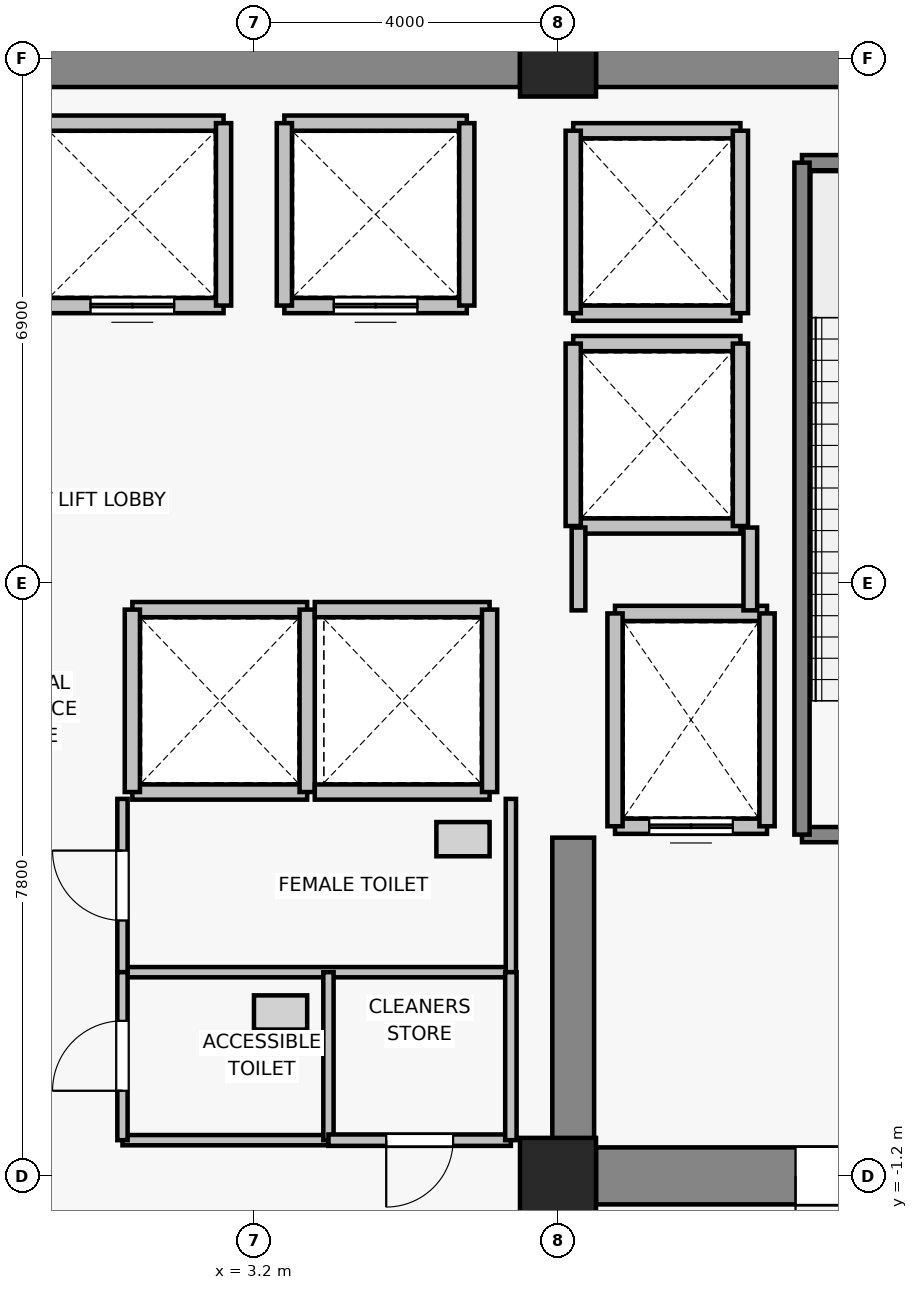
"""IFC4 building model, lengths in metres.
Left out: names, types, materials, properties, quantities, classifications, styles, units other than length and angle.
Written with IfcOpenShell. Run it as: python <this file> out.ifc"""

import sys

from ifc_helpers import new_model, si_unit, direction, frame, frame_2d, origin, origin_2d, place, context, subcontext, project, spatial, rectangle, extrude, source, transform, mapped, element, fill, save


model = new_model("IFC4")
c1 = context("Model", 3, precision=1e-05, world=origin(), true_north=direction((0.0, 1.0)))
c2 = subcontext(c1, "Body", "Model", "MODEL_VIEW")
j1 = project(units=[si_unit("LENGTHUNIT", "METRE"), si_unit("PLANEANGLEUNIT", "RADIAN")], contexts=[c1])
p1 = place(None, origin())
s1 = spatial("IfcSite", under=j1, at=p1, CompositionType="ELEMENT")
p2 = place(p1, origin())
s2 = spatial("IfcBuilding", under=s1, at=p2, CompositionType="ELEMENT")
p3 = place(p2, frame((0.0, 0.0, 80.2)))
s3 = spatial("IfcBuildingStorey", under=s2, at=p3, CompositionType="ELEMENT", Elevation=80.2)
for number, where, z_axis, x_axis in (
    (1, (7.2, -1.2, 0.0), (0.0, 0.0, 1.0), (1.0, 0.0, 0.0)),
    (2, (7.2, 13.5, 0.0), (0.0, 0.0, 1.0), (1.0, 0.0, 0.0)),
):
    element("IfcColumn", number, at=place(p3, frame(where, z_axis=z_axis, x_axis=x_axis)), inside=s3, PredefinedType="COLUMN", context=c2, shape_type="SweptSolid", body=[
        extrude(rectangle(XDim=1.0, YDim=1.0, at=origin_2d()), origin(), (0.0, 0.0, 1.0), 6.6),
    ])
p4 = place(p3, frame((-6.7, 13.5, 0.0), z_axis=(0.0, 0.0, 1.0), x_axis=(1.0, 0.0, 0.0)))
e3 = element("IfcWall", 3, at=p4, inside=s3, PredefinedType="SHEAR", context=c2, shape_type="SweptSolid", body=[
    extrude(rectangle(XDim=13.4, YDim=0.75, at=frame_2d((6.7, 0.0))), origin(), (0.0, 0.0, 1.0), 6.35),
])
p5 = place(p3, frame((7.7, 13.5, 0.0), z_axis=(0.0, 0.0, 1.0), x_axis=(1.0, 0.0, 0.0)))
e4 = element("IfcWall", 4, at=p5, inside=s3, PredefinedType="SHEAR", context=c2, shape_type="SweptSolid", body=[
    extrude(rectangle(XDim=6.2, YDim=0.75, at=frame_2d((3.1, 0.0))), origin(), (0.0, 0.0, 1.0), 6.35),
])
p6 = place(p3, frame((13.9, -1.2, 0.0), z_axis=(0.0, 0.0, 1.0), x_axis=(-1.0, 0.0, 0.0)))
e5 = element("IfcWall", 5, at=p6, inside=s3, PredefinedType="SHEAR", context=c2, shape_type="SweptSolid", body=[
    extrude(rectangle(XDim=6.2, YDim=0.75, at=frame_2d((3.1, 0.0))), origin(), (0.0, 0.0, 1.0), 6.35),
])
p7 = place(p6, frame((2.425, 0.0, 0.0)))
e6 = element("IfcOpeningElement", 6, at=p7, cuts=e5, PredefinedType="OPENING", context=c2, shape_type="SweptSolid", body=[
    extrude(rectangle(XDim=1.15, YDim=2.15, at=frame_2d((0.575, 1.075))), frame((0.0, 0.385, 0.0), z_axis=(0.0, -1.0, 0.0), x_axis=(1.0, 0.0, 0.0)), (0.0, 0.0, 1.0), 0.77),
])
p8 = place(p3, frame((7.4, -0.825, 0.0), z_axis=(0.0, 0.0, 1.0), x_axis=(0.0, 1.0, 0.0)))
e7 = element("IfcWall", 7, at=p8, inside=s3, PredefinedType="SHEAR", context=c2, shape_type="SweptSolid", body=[
    extrude(rectangle(XDim=4.075, YDim=0.55, at=frame_2d((2.038, 0.0))), origin(), (0.0, 0.0, 1.0), 6.35),
])
p9 = place(p3, frame((9.95, 3.4, 0.0), z_axis=(0.0, 0.0, 1.0), x_axis=(-1.0, 0.0, 0.0)))
e8 = element("IfcWall", 8, at=p9, inside=s3, PredefinedType="SOLIDWALL", context=c2, shape_type="SweptSolid", body=[
    extrude(rectangle(XDim=2.0, YDim=0.2, at=frame_2d((1.0, 0.0))), origin(), (0.0, 0.0, 1.0), 6.35),
])
p10 = place(p9, frame((0.45, 0.0, 0.0)))
e9 = element("IfcOpeningElement", 9, at=p10, cuts=e8, PredefinedType="OPENING", context=c2, shape_type="SweptSolid", body=[
    extrude(rectangle(XDim=1.1, YDim=2.2, at=frame_2d((0.55, 1.1))), frame((0.0, 0.11, 0.0), z_axis=(0.0, -1.0, 0.0), x_axis=(1.0, 0.0, 0.0)), (0.0, 0.0, 1.0), 0.22),
])
p11 = place(p3, frame((7.95, 6.2, 0.0), z_axis=(0.0, 0.0, 1.0), x_axis=(1.0, 0.0, 0.0)))
e10 = element("IfcWall", 10, at=p11, inside=s3, PredefinedType="SOLIDWALL", context=c2, shape_type="SweptSolid", body=[
    extrude(rectangle(XDim=2.0, YDim=0.2, at=frame_2d((1.0, 0.0))), origin(), (0.0, 0.0, 1.0), 6.35),
])
for number, where, z_axis, x_axis in (
    (11, (7.95, 3.4, 0.0), (0.0, 0.0, 1.0), (0.0, 1.0, 0.0)),
    (12, (9.95, 6.2, 0.0), (0.0, 0.0, 1.0), (0.0, -1.0, 0.0)),
):
    element("IfcWall", number, at=place(p3, frame(where, z_axis=z_axis, x_axis=x_axis)), inside=s3, PredefinedType="SOLIDWALL", context=c2, shape_type="SweptSolid", body=[
        extrude(rectangle(XDim=2.8, YDim=0.2, at=frame_2d((1.4, 0.0))), origin(), (0.0, 0.0, 1.0), 6.35),
    ])
p12 = place(p3, frame((2.8, 10.25, 0.0), z_axis=(0.0, 0.0, 1.0), x_axis=(-1.0, 0.0, 0.0)))
e13 = element("IfcWall", 13, at=p12, inside=s3, PredefinedType="SOLIDWALL", context=c2, shape_type="SweptSolid", body=[
    extrude(rectangle(XDim=2.4, YDim=0.2, at=frame_2d((1.2, 0.0))), origin(), (0.0, 0.0, 1.0), 6.35),
])
p13 = place(p12, frame((0.65, 0.0, 0.0)))
e14 = element("IfcOpeningElement", 14, at=p13, cuts=e13, PredefinedType="OPENING", context=c2, shape_type="SweptSolid", body=[
    extrude(rectangle(XDim=1.1, YDim=2.2, at=frame_2d((0.55, 1.1))), frame((0.0, 0.11, 0.0), z_axis=(0.0, -1.0, 0.0), x_axis=(1.0, 0.0, 0.0)), (0.0, 0.0, 1.0), 0.22),
])
p14 = place(p3, frame((0.4, 12.65, 0.0), z_axis=(0.0, 0.0, 1.0), x_axis=(1.0, 0.0, 0.0)))
e15 = element("IfcWall", 15, at=p14, inside=s3, PredefinedType="SOLIDWALL", context=c2, shape_type="SweptSolid", body=[
    extrude(rectangle(XDim=2.4, YDim=0.2, at=frame_2d((1.2, 0.0))), origin(), (0.0, 0.0, 1.0), 6.35),
])
p15 = place(p3, frame((2.8, 12.65, 0.0), z_axis=(0.0, 0.0, 1.0), x_axis=(0.0, -1.0, 0.0)))
e16 = element("IfcWall", 16, at=p15, inside=s3, PredefinedType="SOLIDWALL", context=c2, shape_type="SweptSolid", body=[
    extrude(rectangle(XDim=2.4, YDim=0.2, at=frame_2d((1.2, 0.0))), origin(), (0.0, 0.0, 1.0), 6.35),
])
p16 = place(p3, frame((6.0, 10.25, 0.0), z_axis=(0.0, 0.0, 1.0), x_axis=(-1.0, 0.0, 0.0)))
e17 = element("IfcWall", 17, at=p16, inside=s3, PredefinedType="SOLIDWALL", context=c2, shape_type="SweptSolid", body=[
    extrude(rectangle(XDim=2.4, YDim=0.2, at=frame_2d((1.2, 0.0))), origin(), (0.0, 0.0, 1.0), 5.89),
])
p17 = place(p16, frame((0.65, 0.0, 0.0)))
e18 = element("IfcOpeningElement", 18, at=p17, cuts=e17, PredefinedType="OPENING", context=c2, shape_type="SweptSolid", body=[
    extrude(rectangle(XDim=1.1, YDim=2.2, at=frame_2d((0.55, 1.1))), frame((0.0, 0.11, 0.0), z_axis=(0.0, -1.0, 0.0), x_axis=(1.0, 0.0, 0.0)), (0.0, 0.0, 1.0), 0.22),
])
p18 = place(p3, frame((3.6, 12.65, 0.0), z_axis=(0.0, 0.0, 1.0), x_axis=(1.0, 0.0, 0.0)))
e19 = element("IfcWall", 19, at=p18, inside=s3, PredefinedType="SOLIDWALL", context=c2, shape_type="SweptSolid", body=[
    extrude(rectangle(XDim=2.4, YDim=0.2, at=frame_2d((1.2, 0.0))), origin(), (0.0, 0.0, 1.0), 5.89),
])
for number, where, z_axis, x_axis in (
    (20, (3.6, 10.25, 0.0), (0.0, 0.0, 1.0), (0.0, 1.0, 0.0)),
    (21, (6.0, 12.65, 0.0), (0.0, 0.0, 1.0), (0.0, -1.0, 0.0)),
):
    element("IfcWall", number, at=place(p3, frame(where, z_axis=z_axis, x_axis=x_axis)), inside=s3, PredefinedType="SOLIDWALL", context=c2, shape_type="SweptSolid", body=[
        extrude(rectangle(XDim=2.4, YDim=0.2, at=frame_2d((1.2, 0.0))), origin(), (0.0, 0.0, 1.0), 6.35),
    ])
for number, where, z_axis, x_axis in (
    (22, (3.9, 3.85, 0.0), (0.0, 0.0, 1.0), (-1.0, 0.0, 0.0)),
    (23, (1.6, 6.25, 0.0), (0.0, 0.0, 1.0), (1.0, 0.0, 0.0)),
):
    element("IfcWall", number, at=place(p3, frame(where, z_axis=z_axis, x_axis=x_axis)), inside=s3, PredefinedType="SOLIDWALL", context=c2, shape_type="SweptSolid", body=[
        extrude(rectangle(XDim=2.3, YDim=0.2, at=frame_2d((1.15, 0.0))), origin(), (0.0, 0.0, 1.0), 6.35),
    ])
for number, where, z_axis, x_axis in (
    (24, (1.6, 3.85, 0.0), (0.0, 0.0, 1.0), (0.0, 1.0, 0.0)),
    (25, (3.9, 6.25, 0.0), (0.0, 0.0, 1.0), (0.0, -1.0, 0.0)),
):
    element("IfcWall", number, at=place(p3, frame(where, z_axis=z_axis, x_axis=x_axis)), inside=s3, PredefinedType="SOLIDWALL", context=c2, shape_type="SweptSolid", body=[
        extrude(rectangle(XDim=2.4, YDim=0.2, at=frame_2d((1.2, 0.0))), origin(), (0.0, 0.0, 1.0), 6.35),
    ])
for number, where, z_axis, x_axis in (
    (26, (6.3, 3.85, 0.0), (0.0, 0.0, 1.0), (-1.0, 0.0, 0.0)),
    (27, (4.0, 6.25, 0.0), (0.0, 0.0, 1.0), (1.0, 0.0, 0.0)),
):
    element("IfcWall", number, at=place(p3, frame(where, z_axis=z_axis, x_axis=x_axis)), inside=s3, PredefinedType="SOLIDWALL", context=c2, shape_type="SweptSolid", body=[
        extrude(rectangle(XDim=2.3, YDim=0.2, at=frame_2d((1.15, 0.0))), origin(), (0.0, 0.0, 1.0), 6.35),
    ])
p19 = place(p3, frame((6.3, 6.25, 0.0), z_axis=(0.0, 0.0, 1.0), x_axis=(0.0, -1.0, 0.0)))
e28 = element("IfcWall", 28, at=p19, inside=s3, PredefinedType="SOLIDWALL", context=c2, shape_type="SweptSolid", body=[
    extrude(rectangle(XDim=2.4, YDim=0.2, at=frame_2d((1.2, 0.0))), origin(), (0.0, 0.0, 1.0), 6.35),
])
for number, where, z_axis, x_axis in (
    (29, (9.6, 7.35, 0.0), (0.0, 0.0, 1.0), (-1.0, 0.0, 0.0)),
    (30, (7.4, 9.75, 0.0), (0.0, 0.0, 1.0), (1.0, 0.0, 0.0)),
):
    element("IfcWall", number, at=place(p3, frame(where, z_axis=z_axis, x_axis=x_axis)), inside=s3, PredefinedType="SOLIDWALL", context=c2, shape_type="SweptSolid", body=[
        extrude(rectangle(XDim=2.2, YDim=0.2, at=frame_2d((1.1, 0.0))), origin(), (0.0, 0.0, 1.0), 5.79),
    ])
p20 = place(p3, frame((7.4, 7.35, 0.0), z_axis=(0.0, 0.0, 1.0), x_axis=(0.0, 1.0, 0.0)))
e31 = element("IfcWall", 31, at=p20, inside=s3, PredefinedType="SOLIDWALL", context=c2, shape_type="SweptSolid", body=[
    extrude(rectangle(XDim=2.4, YDim=0.2, at=frame_2d((1.2, 0.0))), origin(), (0.0, 0.0, 1.0), 5.79),
])
p21 = place(p3, frame((9.6, 9.75, 0.0), z_axis=(0.0, 0.0, 1.0), x_axis=(0.0, -1.0, 0.0)))
e32 = element("IfcWall", 32, at=p21, inside=s3, PredefinedType="SOLIDWALL", context=c2, shape_type="SweptSolid", body=[
    extrude(rectangle(XDim=2.4, YDim=0.2, at=frame_2d((1.2, 0.0))), origin(), (0.0, 0.0, 1.0), 6.35),
])
for number, where, z_axis, x_axis in (
    (33, (9.6, 10.15, 0.0), (0.0, 0.0, 1.0), (-1.0, 0.0, 0.0)),
    (34, (7.4, 12.55, 0.0), (0.0, 0.0, 1.0), (1.0, 0.0, 0.0)),
):
    element("IfcWall", number, at=place(p3, frame(where, z_axis=z_axis, x_axis=x_axis)), inside=s3, PredefinedType="SOLIDWALL", context=c2, shape_type="SweptSolid", body=[
        extrude(rectangle(XDim=2.2, YDim=0.2, at=frame_2d((1.1, 0.0))), origin(), (0.0, 0.0, 1.0), 5.79),
    ])
p22 = place(p3, frame((7.4, 10.15, 0.0), z_axis=(0.0, 0.0, 1.0), x_axis=(0.0, 1.0, 0.0)))
e35 = element("IfcWall", 35, at=p22, inside=s3, PredefinedType="SOLIDWALL", context=c2, shape_type="SweptSolid", body=[
    extrude(rectangle(XDim=2.4, YDim=0.2, at=frame_2d((1.2, 0.0))), origin(), (0.0, 0.0, 1.0), 5.79),
])
p23 = place(p3, frame((9.6, 12.55, 0.0), z_axis=(0.0, 0.0, 1.0), x_axis=(0.0, -1.0, 0.0)))
e36 = element("IfcWall", 36, at=p23, inside=s3, PredefinedType="SOLIDWALL", context=c2, shape_type="SweptSolid", body=[
    extrude(rectangle(XDim=2.4, YDim=0.2, at=frame_2d((1.2, 0.0))), origin(), (0.0, 0.0, 1.0), 6.35),
])
p24 = place(p3, frame((13.93, 3.29, 0.0), z_axis=(0.0, 0.0, 1.0), x_axis=(-1.0, 0.0, 0.0)))
e37 = element("IfcWall", 37, at=p24, inside=s3, PredefinedType="SOLIDWALL", context=c2, shape_type="SweptSolid", body=[
    extrude(rectangle(XDim=3.52, YDim=0.2, at=frame_2d((1.76, 0.0))), origin(), (0.0, 0.0, 1.0), 6.35),
])
p25 = place(p24, frame((1.205, 0.0, 0.0)))
e38 = element("IfcOpeningElement", 38, at=p25, cuts=e37, PredefinedType="OPENING", context=c2, shape_type="SweptSolid", body=[
    extrude(rectangle(XDim=1.15, YDim=2.15, at=frame_2d((0.575, 1.075))), frame((0.0, 0.11, 0.0), z_axis=(0.0, -1.0, 0.0), x_axis=(1.0, 0.0, 0.0)), (0.0, 0.0, 1.0), 0.22),
])
p26 = place(p3, frame((10.41, 12.13, 0.0), z_axis=(0.0, 0.0, 1.0), x_axis=(1.0, 0.0, 0.0)))
e39 = element("IfcWall", 39, at=p26, inside=s3, PredefinedType="SOLIDWALL", context=c2, shape_type="SweptSolid", body=[
    extrude(rectangle(XDim=3.52, YDim=0.2, at=frame_2d((1.76, 0.0))), origin(), (0.0, 0.0, 1.0), 6.35),
])
p27 = place(p3, frame((10.41, 3.29, 0.0), z_axis=(0.0, 0.0, 1.0), x_axis=(0.0, 1.0, 0.0)))
e40 = element("IfcWall", 40, at=p27, inside=s3, PredefinedType="SOLIDWALL", context=c2, shape_type="SweptSolid", body=[
    extrude(rectangle(XDim=8.84, YDim=0.2, at=frame_2d((4.42, 0.0))), origin(), (0.0, 0.0, 1.0), 6.35),
])
p28 = place(p3, frame((7.47, 6.24, 0.0), z_axis=(0.0, 0.0, 1.0), x_axis=(0.0, 1.0, 0.0)))
e41 = element("IfcWall", 41, at=p28, inside=s3, PredefinedType="PARTITIONING", context=c2, shape_type="SweptSolid", body=[
    extrude(rectangle(XDim=1.09, YDim=0.18, at=frame_2d((0.545, 0.0))), origin(), (0.0, 0.0, 1.0), 5.79),
])
p29 = place(p3, frame((9.73, 7.33, 0.0), z_axis=(0.0, 0.0, 1.0), x_axis=(0.0, -1.0, 0.0)))
e42 = element("IfcWall", 42, at=p29, inside=s3, PredefinedType="PARTITIONING", context=c2, shape_type="SweptSolid", body=[
    extrude(rectangle(XDim=1.09, YDim=0.18, at=frame_2d((0.545, 0.0))), origin(), (0.0, 0.0, 1.0), 6.35),
])
p30 = place(p3, frame((6.58, 1.48, 0.0), z_axis=(0.0, 0.0, 1.0), x_axis=(-1.0, 0.0, 0.0)))
e43 = element("IfcWall", 43, at=p30, inside=s3, PredefinedType="PARTITIONING", context=c2, shape_type="SweptSolid", body=[
    extrude(rectangle(XDim=5.11, YDim=0.135, at=frame_2d((2.555, 0.0))), origin(), (0.0, 0.0, 1.0), 6.35),
])
p31 = place(p3, frame((1.47, 1.48, 0.0), z_axis=(0.0, 0.0, 1.0), x_axis=(0.0, 1.0, 0.0)))
e44 = element("IfcWall", 44, at=p31, inside=s3, PredefinedType="PARTITIONING", context=c2, shape_type="SweptSolid", body=[
    extrude(rectangle(XDim=2.28, YDim=0.135, at=frame_2d((1.14, 0.0))), origin(), (0.0, 0.0, 1.0), 6.35),
])
p32 = place(p31, frame((0.68, 0.0, 0.0)))
e45 = element("IfcOpeningElement", 45, at=p32, cuts=e44, PredefinedType="OPENING", context=c2, shape_type="SweptSolid", body=[
    extrude(rectangle(XDim=0.92, YDim=2.1, at=frame_2d((0.46, 1.05))), frame((0.0, 0.077, 0.0), z_axis=(0.0, -1.0, 0.0), x_axis=(1.0, 0.0, 0.0)), (0.0, 0.0, 1.0), 0.155),
])
p33 = place(p3, frame((6.58, 3.76, 0.0), z_axis=(0.0, 0.0, 1.0), x_axis=(0.0, -1.0, 0.0)))
e46 = element("IfcWall", 46, at=p33, inside=s3, PredefinedType="PARTITIONING", context=c2, shape_type="SweptSolid", body=[
    extrude(rectangle(XDim=2.28, YDim=0.135, at=frame_2d((1.14, 0.0))), origin(), (0.0, 0.0, 1.0), 6.35),
])
p34 = place(p3, frame((4.18, -0.73, 0.0), z_axis=(0.0, 0.0, 1.0), x_axis=(-1.0, 0.0, 0.0)))
e47 = element("IfcWall", 47, at=p34, inside=s3, PredefinedType="PARTITIONING", context=c2, shape_type="SweptSolid", body=[
    extrude(rectangle(XDim=2.71, YDim=0.135, at=frame_2d((1.355, 0.0))), origin(), (0.0, 0.0, 1.0), 6.35),
])
p35 = place(p3, frame((1.47, -0.73, 0.0), z_axis=(0.0, 0.0, 1.0), x_axis=(0.0, 1.0, 0.0)))
e48 = element("IfcWall", 48, at=p35, inside=s3, PredefinedType="PARTITIONING", context=c2, shape_type="SweptSolid", body=[
    extrude(rectangle(XDim=2.21, YDim=0.135, at=frame_2d((1.105, 0.0))), origin(), (0.0, 0.0, 1.0), 6.35),
])
p36 = place(p35, frame((0.65, 0.0, 0.0)))
e49 = element("IfcOpeningElement", 49, at=p36, cuts=e48, PredefinedType="OPENING", context=c2, shape_type="SweptSolid", body=[
    extrude(rectangle(XDim=0.92, YDim=2.1, at=frame_2d((0.46, 1.05))), frame((0.0, 0.077, 0.0), z_axis=(0.0, -1.0, 0.0), x_axis=(1.0, 0.0, 0.0)), (0.0, 0.0, 1.0), 0.155),
])
p37 = place(p3, frame((4.18, 1.48, 0.0), z_axis=(0.0, 0.0, 1.0), x_axis=(0.0, -1.0, 0.0)))
e50 = element("IfcWall", 50, at=p37, inside=s3, PredefinedType="PARTITIONING", context=c2, shape_type="SweptSolid", body=[
    extrude(rectangle(XDim=2.21, YDim=0.135, at=frame_2d((1.105, 0.0))), origin(), (0.0, 0.0, 1.0), 6.35),
])
p38 = place(p3, frame((6.58, -0.73, 0.0), z_axis=(0.0, 0.0, 1.0), x_axis=(-1.0, 0.0, 0.0)))
e51 = element("IfcWall", 51, at=p38, inside=s3, PredefinedType="PARTITIONING", context=c2, shape_type="SweptSolid", body=[
    extrude(rectangle(XDim=2.4, YDim=0.15, at=frame_2d((1.2, 0.0))), origin(), (0.0, 0.0, 1.0), 6.35),
])
p39 = place(p38, frame((0.76, 0.0, 0.0)))
e52 = element("IfcOpeningElement", 52, at=p39, cuts=e51, PredefinedType="OPENING", context=c2, shape_type="SweptSolid", body=[
    extrude(rectangle(XDim=0.88, YDim=2.1, at=frame_2d((0.44, 1.05))), frame((0.0, 0.085, 0.0), z_axis=(0.0, -1.0, 0.0), x_axis=(1.0, 0.0, 0.0)), (0.0, 0.0, 1.0), 0.17),
])
p40 = place(p3, frame((6.58, 1.48, 0.0), z_axis=(0.0, 0.0, 1.0), x_axis=(0.0, -1.0, 0.0)))
e53 = element("IfcWall", 53, at=p40, inside=s3, PredefinedType="PARTITIONING", context=c2, shape_type="SweptSolid", body=[
    extrude(rectangle(XDim=2.21, YDim=0.15, at=frame_2d((1.105, 0.0))), origin(), (0.0, 0.0, 1.0), 6.35),
])
m1 = source(origin(), c2, "Body", "SweptSolid", [
    extrude(rectangle(XDim=1.1, YDim=2.2, at=frame_2d((0.55, 1.1))), frame((0.0, 0.025, 0.0), z_axis=(0.0, -1.0, 0.0), x_axis=(1.0, 0.0, 0.0)), (0.0, 0.0, 1.0), 0.05),
])
p41 = place(p10, origin())
e54 = element("IfcDoor", 54, at=p41, inside=s3, OperationType="DOUBLE_DOOR_SLIDING", PredefinedType="DOOR", context=c2, shape_type="MappedRepresentation", body=[
    mapped(m1, transform((0.0, 0.0, 0.0), x_axis=(1.0, 0.0, 0.0), y_axis=(0.0, 1.0, 0.0), z_axis=(0.0, 0.0, 1.0), scale=1.0)),
])
fill(e9, e54)
p42 = place(p13, origin())
e55 = element("IfcDoor", 55, at=p42, inside=s3, OperationType="DOUBLE_DOOR_SLIDING", PredefinedType="DOOR", context=c2, shape_type="MappedRepresentation", body=[
    mapped(m1, transform((0.0, 0.0, 0.0), x_axis=(1.0, 0.0, 0.0), y_axis=(0.0, 1.0, 0.0), z_axis=(0.0, 0.0, 1.0), scale=1.0)),
])
fill(e14, e55)
p43 = place(p17, origin())
e56 = element("IfcDoor", 56, at=p43, inside=s3, OperationType="DOUBLE_DOOR_SLIDING", PredefinedType="DOOR", context=c2, shape_type="MappedRepresentation", body=[
    mapped(m1, transform((0.0, 0.0, 0.0), x_axis=(1.0, 0.0, 0.0), y_axis=(0.0, 1.0, 0.0), z_axis=(0.0, 0.0, 1.0), scale=1.0)),
])
fill(e18, e56)
m2 = source(origin(), c2, "Body", "SweptSolid", [
    extrude(rectangle(XDim=1.15, YDim=2.15, at=frame_2d((0.575, 1.075))), frame((0.0, 0.025, 0.0), z_axis=(0.0, -1.0, 0.0), x_axis=(1.0, 0.0, 0.0)), (0.0, 0.0, 1.0), 0.05),
])
p44 = place(p7, origin())
e57 = element("IfcDoor", 57, at=p44, inside=s3, OperationType="SINGLE_SWING_RIGHT", PredefinedType="DOOR", context=c2, shape_type="MappedRepresentation", body=[
    mapped(m2, transform((0.0, 0.0, 0.0), x_axis=(1.0, 0.0, 0.0), y_axis=(0.0, 1.0, 0.0), z_axis=(0.0, 0.0, 1.0), scale=1.0)),
])
fill(e6, e57)
m3 = source(origin(), c2, "Body", "SweptSolid", [
    extrude(rectangle(XDim=0.92, YDim=2.1, at=frame_2d((0.46, 1.05))), frame((0.0, 0.025, 0.0), z_axis=(0.0, -1.0, 0.0), x_axis=(1.0, 0.0, 0.0)), (0.0, 0.0, 1.0), 0.05),
])
p45 = place(p32, origin())
e58 = element("IfcDoor", 58, at=p45, inside=s3, OperationType="SINGLE_SWING_RIGHT", PredefinedType="DOOR", context=c2, shape_type="MappedRepresentation", body=[
    mapped(m3, transform((0.0, 0.0, 0.0), x_axis=(1.0, 0.0, 0.0), y_axis=(0.0, 1.0, 0.0), z_axis=(0.0, 0.0, 1.0), scale=1.0)),
])
fill(e45, e58)
p46 = place(p36, origin())
e59 = element("IfcDoor", 59, at=p46, inside=s3, OperationType="SINGLE_SWING_LEFT", PredefinedType="DOOR", context=c2, shape_type="MappedRepresentation", body=[
    mapped(m3, transform((0.0, 0.0, 0.0), x_axis=(1.0, 0.0, 0.0), y_axis=(0.0, 1.0, 0.0), z_axis=(0.0, 0.0, 1.0), scale=1.0)),
])
fill(e49, e59)
m4 = source(origin(), c2, "Body", "SweptSolid", [
    extrude(rectangle(XDim=0.88, YDim=2.1, at=frame_2d((0.44, 1.05))), frame((0.0, 0.025, 0.0), z_axis=(0.0, -1.0, 0.0), x_axis=(1.0, 0.0, 0.0)), (0.0, 0.0, 1.0), 0.05),
])
p47 = place(p39, origin())
e60 = element("IfcDoor", 60, at=p47, inside=s3, OperationType="SINGLE_SWING_RIGHT", PredefinedType="DOOR", context=c2, shape_type="MappedRepresentation", body=[
    mapped(m4, transform((0.0, 0.0, 0.0), x_axis=(1.0, 0.0, 0.0), y_axis=(0.0, 1.0, 0.0), z_axis=(0.0, 0.0, 1.0), scale=1.0)),
])
fill(e52, e60)
save(model, sys.argv[1])
